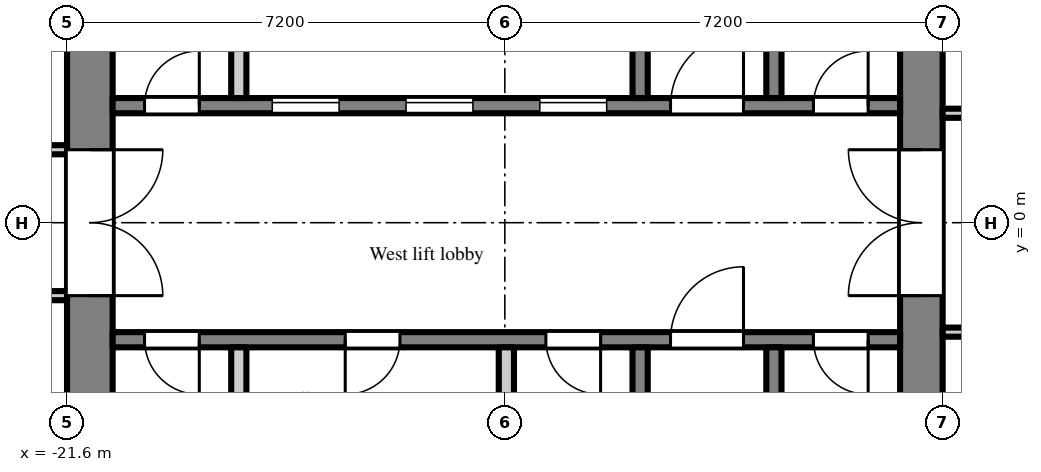
"""IFC4 building model, lengths in metres.
Left out: names, types, materials, properties, quantities, classifications, styles, units other than length and angle.
Written with IfcOpenShell. Run it as: python <this file> out.ifc"""

import sys

from ifc_helpers import new_model, si_unit, direction, frame, frame_2d, origin, place, context, subcontext, project, spatial, rectangle, extrude, element, fill, save


model = new_model("IFC4")
c1 = context("Model", 3, precision=1e-05, world=origin(), true_north=direction((0.0, 1.0)))
c2 = subcontext(c1, "Body", "Model", "MODEL_VIEW")
j1 = project(units=[si_unit("LENGTHUNIT", "METRE"), si_unit("PLANEANGLEUNIT", "RADIAN")], contexts=[c1])
p1 = place(None, origin())
s1 = spatial("IfcSite", under=j1, at=p1, CompositionType="ELEMENT")
p2 = place(p1, origin())
s2 = spatial("IfcBuilding", under=s1, at=p2, CompositionType="ELEMENT")
p3 = place(p2, frame((0.0, 0.0, 166.5)))
s3 = spatial("IfcBuildingStorey", under=s2, at=p3, CompositionType="ELEMENT", Elevation=166.5)
p4 = place(p3, frame((-7.55, -7.2, 0.0), z_axis=(0.0, 0.0, 1.0), x_axis=(0.0, 1.0, 0.0)))
e1 = element("IfcWall", 1, at=p4, inside=s3, PredefinedType="SHEAR", context=c2, shape_type="SweptSolid", body=[
    extrude(rectangle(XDim=14.4, YDim=0.7, at=frame_2d((7.2, 0.0))), origin(), (0.0, 0.0, 1.0), 3.8),
])
p5 = place(p4, frame((6.0, 0.0, 0.0)))
e2 = element("IfcOpeningElement", 2, at=p5, cuts=e1, PredefinedType="OPENING", context=c2, shape_type="SweptSolid", body=[
    extrude(rectangle(XDim=2.4, YDim=2.2, at=frame_2d((1.2, 1.1))), frame((0.0, 0.36, 0.0), z_axis=(0.0, -1.0, 0.0), x_axis=(1.0, 0.0, 0.0)), (0.0, 0.0, 1.0), 0.72),
])
p6 = place(p3, frame((-21.225, -7.2, 0.0), z_axis=(0.0, 0.0, 1.0), x_axis=(0.0, 1.0, 0.0)))
e3 = element("IfcWall", 3, at=p6, inside=s3, PredefinedType="SHEAR", context=c2, shape_type="SweptSolid", body=[
    extrude(rectangle(XDim=14.4, YDim=0.75, at=frame_2d((7.2, 0.0))), origin(), (0.0, 0.0, 1.0), 3.8),
])
p7 = place(p6, frame((6.0, 0.0, 0.0)))
e4 = element("IfcOpeningElement", 4, at=p7, cuts=e3, PredefinedType="OPENING", context=c2, shape_type="SweptSolid", body=[
    extrude(rectangle(XDim=2.4, YDim=2.2, at=frame_2d((1.2, 1.1))), frame((0.0, 0.385, 0.0), z_axis=(0.0, -1.0, 0.0), x_axis=(1.0, 0.0, 0.0)), (0.0, 0.0, 1.0), 0.77),
])
p8 = place(p3, frame((-7.9, 1.925, 0.0), z_axis=(0.0, 0.0, 1.0), x_axis=(-1.0, 0.0, 0.0)))
e5 = element("IfcWall", 5, at=p8, inside=s3, PredefinedType="SHEAR", context=c2, shape_type="SweptSolid", body=[
    extrude(rectangle(XDim=12.95, YDim=0.25, at=frame_2d((6.475, 0.0))), origin(), (0.0, 0.0, 1.0), 3.8),
])
p9 = place(p8, frame((4.825, 0.0, 0.0)))
e6 = element("IfcOpeningElement", 6, at=p9, cuts=e5, PredefinedType="OPENING", context=c2, shape_type="SweptSolid", body=[
    extrude(rectangle(XDim=1.1, YDim=2.1, at=frame_2d((0.55, 1.05))), frame((0.0, 0.135, 0.0), z_axis=(0.0, -1.0, 0.0), x_axis=(1.0, 0.0, 0.0)), (0.0, 0.0, 1.0), 0.27),
])
p10 = place(p8, frame((7.025, 0.0, 0.0)))
e7 = element("IfcOpeningElement", 7, at=p10, cuts=e5, PredefinedType="OPENING", context=c2, shape_type="SweptSolid", body=[
    extrude(rectangle(XDim=1.1, YDim=2.1, at=frame_2d((0.55, 1.05))), frame((0.0, 0.135, 0.0), z_axis=(0.0, -1.0, 0.0), x_axis=(1.0, 0.0, 0.0)), (0.0, 0.0, 1.0), 0.27),
])
p11 = place(p8, frame((9.225, 0.0, 0.0)))
e8 = element("IfcOpeningElement", 8, at=p11, cuts=e5, PredefinedType="OPENING", context=c2, shape_type="SweptSolid", body=[
    extrude(rectangle(XDim=1.1, YDim=2.1, at=frame_2d((0.55, 1.05))), frame((0.0, 0.135, 0.0), z_axis=(0.0, -1.0, 0.0), x_axis=(1.0, 0.0, 0.0)), (0.0, 0.0, 1.0), 0.27),
])
p12 = place(p8, frame((0.525, 0.0, 0.0)))
e9 = element("IfcOpeningElement", 9, at=p12, cuts=e5, PredefinedType="OPENING", context=c2, shape_type="SweptSolid", body=[
    extrude(rectangle(XDim=0.9, YDim=2.1, at=frame_2d((0.45, 1.05))), frame((0.0, 0.135, 0.0), z_axis=(0.0, -1.0, 0.0), x_axis=(1.0, 0.0, 0.0)), (0.0, 0.0, 1.0), 0.27),
])
p13 = place(p8, frame((2.575, 0.0, 0.0)))
e10 = element("IfcOpeningElement", 10, at=p13, cuts=e5, PredefinedType="OPENING", context=c2, shape_type="SweptSolid", body=[
    extrude(rectangle(XDim=1.2, YDim=2.1, at=frame_2d((0.6, 1.05))), frame((0.0, 0.135, 0.0), z_axis=(0.0, -1.0, 0.0), x_axis=(1.0, 0.0, 0.0)), (0.0, 0.0, 1.0), 0.27),
])
p14 = place(p8, frame((11.525, 0.0, 0.0)))
e11 = element("IfcOpeningElement", 11, at=p14, cuts=e5, PredefinedType="OPENING", context=c2, shape_type="SweptSolid", body=[
    extrude(rectangle(XDim=0.9, YDim=2.1, at=frame_2d((0.45, 1.05))), frame((0.0, 0.135, 0.0), z_axis=(0.0, -1.0, 0.0), x_axis=(1.0, 0.0, 0.0)), (0.0, 0.0, 1.0), 0.27),
])
p15 = place(p3, frame((-9.975, 2.05, 0.0), z_axis=(0.0, 0.0, 1.0), x_axis=(0.0, 1.0, 0.0)))
e12 = element("IfcWall", 12, at=p15, inside=s3, PredefinedType="SHEAR", context=c2, shape_type="SweptSolid", body=[
    extrude(rectangle(XDim=4.75, YDim=0.25, at=frame_2d((2.375, 0.0))), origin(), (0.0, 0.0, 1.0), 3.8),
])
p16 = place(p15, frame((2.95, 0.0, 0.0)))
e13 = element("IfcOpeningElement", 13, at=p16, cuts=e12, PredefinedType="OPENING", context=c2, shape_type="SweptSolid", body=[
    extrude(rectangle(XDim=1.1, YDim=2.1, at=frame_2d((0.55, 1.05))), frame((0.0, 0.135, 0.0), z_axis=(0.0, -1.0, 0.0), x_axis=(1.0, 0.0, 0.0)), (0.0, 0.0, 1.0), 0.27),
])
p17 = place(p3, frame((-12.175, 2.05, 0.0), z_axis=(0.0, 0.0, 1.0), x_axis=(0.0, 1.0, 0.0)))
e14 = element("IfcWall", 14, at=p17, inside=s3, PredefinedType="SHEAR", context=c2, shape_type="SweptSolid", body=[
    extrude(rectangle(XDim=4.75, YDim=0.25, at=frame_2d((2.375, 0.0))), origin(), (0.0, 0.0, 1.0), 3.8),
])
p18 = place(p17, frame((2.95, 0.0, 0.0)))
e15 = element("IfcOpeningElement", 15, at=p18, cuts=e14, PredefinedType="OPENING", context=c2, shape_type="SweptSolid", body=[
    extrude(rectangle(XDim=1.2, YDim=2.1, at=frame_2d((0.6, 1.05))), frame((0.0, 0.135, 0.0), z_axis=(0.0, -1.0, 0.0), x_axis=(1.0, 0.0, 0.0)), (0.0, 0.0, 1.0), 0.27),
])
p19 = place(p3, frame((-18.775, 2.05, 0.0), z_axis=(0.0, 0.0, 1.0), x_axis=(0.0, 1.0, 0.0)))
e16 = element("IfcWall", 16, at=p19, inside=s3, PredefinedType="PARTITIONING", context=c2, shape_type="SweptSolid", body=[
    extrude(rectangle(XDim=2.1, YDim=0.25, at=frame_2d((1.05, 0.0))), origin(), (0.0, 0.0, 1.0), 3.8),
])
p20 = place(p3, frame((-7.9, -1.925, 0.0), z_axis=(0.0, 0.0, 1.0), x_axis=(-1.0, 0.0, 0.0)))
e17 = element("IfcWall", 17, at=p20, inside=s3, PredefinedType="SHEAR", context=c2, shape_type="SweptSolid", body=[
    extrude(rectangle(XDim=12.95, YDim=0.25, at=frame_2d((6.475, 0.0))), origin(), (0.0, 0.0, 1.0), 3.8),
])
p21 = place(p20, frame((0.525, 0.0, 0.0)))
e18 = element("IfcOpeningElement", 18, at=p21, cuts=e17, PredefinedType="OPENING", context=c2, shape_type="SweptSolid", body=[
    extrude(rectangle(XDim=0.9, YDim=2.1, at=frame_2d((0.45, 1.05))), frame((0.0, 0.135, 0.0), z_axis=(0.0, -1.0, 0.0), x_axis=(1.0, 0.0, 0.0)), (0.0, 0.0, 1.0), 0.27),
])
p22 = place(p20, frame((2.575, 0.0, 0.0)))
e19 = element("IfcOpeningElement", 19, at=p22, cuts=e17, PredefinedType="OPENING", context=c2, shape_type="SweptSolid", body=[
    extrude(rectangle(XDim=1.2, YDim=2.1, at=frame_2d((0.6, 1.05))), frame((0.0, 0.135, 0.0), z_axis=(0.0, -1.0, 0.0), x_axis=(1.0, 0.0, 0.0)), (0.0, 0.0, 1.0), 0.27),
])
p23 = place(p20, frame((4.925, 0.0, 0.0)))
e20 = element("IfcOpeningElement", 20, at=p23, cuts=e17, PredefinedType="OPENING", context=c2, shape_type="SweptSolid", body=[
    extrude(rectangle(XDim=0.9, YDim=2.1, at=frame_2d((0.45, 1.05))), frame((0.0, 0.135, 0.0), z_axis=(0.0, -1.0, 0.0), x_axis=(1.0, 0.0, 0.0)), (0.0, 0.0, 1.0), 0.27),
])
p24 = place(p20, frame((8.225, 0.0, 0.0)))
e21 = element("IfcOpeningElement", 21, at=p24, cuts=e17, PredefinedType="OPENING", context=c2, shape_type="SweptSolid", body=[
    extrude(rectangle(XDim=0.9, YDim=2.1, at=frame_2d((0.45, 1.05))), frame((0.0, 0.135, 0.0), z_axis=(0.0, -1.0, 0.0), x_axis=(1.0, 0.0, 0.0)), (0.0, 0.0, 1.0), 0.27),
])
p25 = place(p20, frame((11.525, 0.0, 0.0)))
e22 = element("IfcOpeningElement", 22, at=p25, cuts=e17, PredefinedType="OPENING", context=c2, shape_type="SweptSolid", body=[
    extrude(rectangle(XDim=0.9, YDim=2.1, at=frame_2d((0.45, 1.05))), frame((0.0, 0.135, 0.0), z_axis=(0.0, -1.0, 0.0), x_axis=(1.0, 0.0, 0.0)), (0.0, 0.0, 1.0), 0.27),
])
p26 = place(p3, frame((-9.975, -2.05, 0.0), z_axis=(0.0, 0.0, 1.0), x_axis=(0.0, -1.0, 0.0)))
e23 = element("IfcWall", 23, at=p26, inside=s3, PredefinedType="SHEAR", context=c2, shape_type="SweptSolid", body=[
    extrude(rectangle(XDim=4.75, YDim=0.25, at=frame_2d((2.375, 0.0))), origin(), (0.0, 0.0, 1.0), 3.8),
])
p27 = place(p26, frame((2.95, 0.0, 0.0)))
e24 = element("IfcOpeningElement", 24, at=p27, cuts=e23, PredefinedType="OPENING", context=c2, shape_type="SweptSolid", body=[
    extrude(rectangle(XDim=1.1, YDim=2.1, at=frame_2d((0.55, 1.05))), frame((0.0, 0.135, 0.0), z_axis=(0.0, -1.0, 0.0), x_axis=(1.0, 0.0, 0.0)), (0.0, 0.0, 1.0), 0.27),
])
p28 = place(p3, frame((-12.175, -2.05, 0.0), z_axis=(0.0, 0.0, 1.0), x_axis=(0.0, -1.0, 0.0)))
e25 = element("IfcWall", 25, at=p28, inside=s3, PredefinedType="SHEAR", context=c2, shape_type="SweptSolid", body=[
    extrude(rectangle(XDim=4.75, YDim=0.25, at=frame_2d((2.375, 0.0))), origin(), (0.0, 0.0, 1.0), 3.8),
])
p29 = place(p28, frame((2.95, 0.0, 0.0)))
e26 = element("IfcOpeningElement", 26, at=p29, cuts=e25, PredefinedType="OPENING", context=c2, shape_type="SweptSolid", body=[
    extrude(rectangle(XDim=1.2, YDim=2.1, at=frame_2d((0.6, 1.05))), frame((0.0, 0.135, 0.0), z_axis=(0.0, -1.0, 0.0), x_axis=(1.0, 0.0, 0.0)), (0.0, 0.0, 1.0), 0.27),
])
for number, where, z_axis, x_axis in (
    (27, (-14.375, -2.05, 0.0), (0.0, 0.0, 1.0), (0.0, -1.0, 0.0)),
    (28, (-18.775, -2.05, 0.0), (0.0, 0.0, 1.0), (0.0, -1.0, 0.0)),
):
    element("IfcWall", number, at=place(p3, frame(where, z_axis=z_axis, x_axis=x_axis)), inside=s3, PredefinedType="PARTITIONING", context=c2, shape_type="SweptSolid", body=[
        extrude(rectangle(XDim=2.1, YDim=0.25, at=frame_2d((1.05, 0.0))), origin(), (0.0, 0.0, 1.0), 3.8),
    ])
p30 = place(p3, frame((-36.5, -1.2, 0.0), z_axis=(0.0, 0.0, 1.0), x_axis=(1.0, 0.0, 0.0)))
e29 = element("IfcWall", 29, at=p30, inside=s3, PredefinedType="PARTITIONING", context=c2, shape_type="SweptSolid", body=[
    extrude(rectangle(XDim=14.9, YDim=0.15, at=frame_2d((7.45, 0.0))), origin(), (0.0, 0.0, 1.0), 3.8),
])
p31 = place(p30, frame((6.15, 0.0, 0.0)))
e30 = element("IfcOpeningElement", 30, at=p31, cuts=e29, PredefinedType="OPENING", context=c2, shape_type="SweptSolid", body=[
    extrude(rectangle(XDim=1.8, YDim=2.1, at=frame_2d((0.9, 1.05))), frame((0.0, 0.085, 0.0), z_axis=(0.0, -1.0, 0.0), x_axis=(1.0, 0.0, 0.0)), (0.0, 0.0, 1.0), 0.17),
])
p32 = place(p30, frame((9.2, 0.0, 0.0)))
e31 = element("IfcOpeningElement", 31, at=p32, cuts=e29, PredefinedType="OPENING", context=c2, shape_type="SweptSolid", body=[
    extrude(rectangle(XDim=1.8, YDim=2.1, at=frame_2d((0.9, 1.05))), frame((0.0, 0.085, 0.0), z_axis=(0.0, -1.0, 0.0), x_axis=(1.0, 0.0, 0.0)), (0.0, 0.0, 1.0), 0.17),
])
p33 = place(p30, frame((12.45, 0.0, 0.0)))
e32 = element("IfcOpeningElement", 32, at=p33, cuts=e29, PredefinedType="OPENING", context=c2, shape_type="SweptSolid", body=[
    extrude(rectangle(XDim=1.8, YDim=2.1, at=frame_2d((0.9, 1.05))), frame((0.0, 0.085, 0.0), z_axis=(0.0, -1.0, 0.0), x_axis=(1.0, 0.0, 0.0)), (0.0, 0.0, 1.0), 0.17),
])
p34 = place(p30, frame((2.15, 0.0, 0.0)))
e33 = element("IfcOpeningElement", 33, at=p34, cuts=e29, PredefinedType="OPENING", context=c2, shape_type="SweptSolid", body=[
    extrude(rectangle(XDim=1.0, YDim=2.1, at=frame_2d((0.5, 1.05))), frame((0.0, 0.085, 0.0), z_axis=(0.0, -1.0, 0.0), x_axis=(1.0, 0.0, 0.0)), (0.0, 0.0, 1.0), 0.17),
])
p35 = place(p3, frame((-36.5, 1.2, 0.0), z_axis=(0.0, 0.0, 1.0), x_axis=(1.0, 0.0, 0.0)))
e34 = element("IfcWall", 34, at=p35, inside=s3, PredefinedType="PARTITIONING", context=c2, shape_type="SweptSolid", body=[
    extrude(rectangle(XDim=14.9, YDim=0.15, at=frame_2d((7.45, 0.0))), origin(), (0.0, 0.0, 1.0), 3.8),
])
p36 = place(p35, frame((3.55, 0.0, 0.0)))
e35 = element("IfcOpeningElement", 35, at=p36, cuts=e34, PredefinedType="OPENING", context=c2, shape_type="SweptSolid", body=[
    extrude(rectangle(XDim=1.8, YDim=2.1, at=frame_2d((0.9, 1.05))), frame((0.0, 0.085, 0.0), z_axis=(0.0, -1.0, 0.0), x_axis=(1.0, 0.0, 0.0)), (0.0, 0.0, 1.0), 0.17),
])
p37 = place(p35, frame((8.4, 0.0, 0.0)))
e36 = element("IfcOpeningElement", 36, at=p37, cuts=e34, PredefinedType="OPENING", context=c2, shape_type="SweptSolid", body=[
    extrude(rectangle(XDim=1.0, YDim=2.1, at=frame_2d((0.5, 1.05))), frame((0.0, 0.085, 0.0), z_axis=(0.0, -1.0, 0.0), x_axis=(1.0, 0.0, 0.0)), (0.0, 0.0, 1.0), 0.17),
])
p38 = place(p35, frame((12.25, 0.0, 0.0)))
e37 = element("IfcOpeningElement", 37, at=p38, cuts=e34, PredefinedType="OPENING", context=c2, shape_type="SweptSolid", body=[
    extrude(rectangle(XDim=1.8, YDim=2.1, at=frame_2d((0.9, 1.05))), frame((0.0, 0.085, 0.0), z_axis=(0.0, -1.0, 0.0), x_axis=(1.0, 0.0, 0.0)), (0.0, 0.0, 1.0), 0.17),
])
p39 = place(p35, frame((0.55, 0.0, 0.0)))
e38 = element("IfcOpeningElement", 38, at=p39, cuts=e34, PredefinedType="OPENING", context=c2, shape_type="SweptSolid", body=[
    extrude(rectangle(XDim=1.8, YDim=2.1, at=frame_2d((0.9, 1.05))), frame((0.0, 0.085, 0.0), z_axis=(0.0, -1.0, 0.0), x_axis=(1.0, 0.0, 0.0)), (0.0, 0.0, 1.0), 0.17),
])
p40 = place(p3, frame((-7.2, -1.8, 0.0), z_axis=(0.0, 0.0, 1.0), x_axis=(1.0, 0.0, 0.0)))
e39 = element("IfcWall", 39, at=p40, inside=s3, PredefinedType="PARTITIONING", context=c2, shape_type="SweptSolid", body=[
    extrude(rectangle(XDim=5.325, YDim=0.15, at=frame_2d((2.663, 0.0))), origin(), (0.0, 0.0, 1.0), 3.8),
])
p41 = place(p40, frame((1.305, 0.0, 0.0)))
e40 = element("IfcOpeningElement", 40, at=p41, cuts=e39, PredefinedType="OPENING", context=c2, shape_type="SweptSolid", body=[
    extrude(rectangle(XDim=0.9, YDim=2.1, at=frame_2d((0.45, 1.05))), frame((0.0, 0.085, 0.0), z_axis=(0.0, -1.0, 0.0), x_axis=(1.0, 0.0, 0.0)), (0.0, 0.0, 1.0), 0.17),
])
p42 = place(p3, frame((-7.2, 1.8, 0.0), z_axis=(0.0, 0.0, 1.0), x_axis=(1.0, 0.0, 0.0)))
e41 = element("IfcWall", 41, at=p42, inside=s3, PredefinedType="PARTITIONING", context=c2, shape_type="SweptSolid", body=[
    extrude(rectangle(XDim=5.325, YDim=0.15, at=frame_2d((2.663, 0.0))), origin(), (0.0, 0.0, 1.0), 3.8),
])
p43 = place(p42, frame((0.65, 0.0, 0.0)))
e42 = element("IfcOpeningElement", 42, at=p43, cuts=e41, PredefinedType="OPENING", context=c2, shape_type="SweptSolid", body=[
    extrude(rectangle(XDim=0.9, YDim=2.1, at=frame_2d((0.45, 1.05))), frame((0.0, 0.085, 0.0), z_axis=(0.0, -1.0, 0.0), x_axis=(1.0, 0.0, 0.0)), (0.0, 0.0, 1.0), 0.17),
])
p44 = place(p42, frame((4.325, 0.0, 0.0)))
e43 = element("IfcOpeningElement", 43, at=p44, cuts=e41, PredefinedType="OPENING", context=c2, shape_type="SweptSolid", body=[
    extrude(rectangle(XDim=0.9, YDim=2.1, at=frame_2d((0.45, 1.05))), frame((0.0, 0.085, 0.0), z_axis=(0.0, -1.0, 0.0), x_axis=(1.0, 0.0, 0.0)), (0.0, 0.0, 1.0), 0.17),
])
p45 = place(p9, origin())
e44 = element("IfcDoor", 44, at=p45, inside=s3, OperationType="SLIDING_TO_LEFT", PredefinedType="DOOR", context=c2, shape_type="SweptSolid", body=[
    extrude(rectangle(XDim=1.1, YDim=2.1, at=frame_2d((0.55, 1.05))), frame((0.0, 0.025, 0.0), z_axis=(0.0, -1.0, 0.0), x_axis=(1.0, 0.0, 0.0)), (0.0, 0.0, 1.0), 0.05),
])
fill(e6, e44)
p46 = place(p10, origin())
e45 = element("IfcDoor", 45, at=p46, inside=s3, OperationType="SLIDING_TO_LEFT", PredefinedType="DOOR", context=c2, shape_type="SweptSolid", body=[
    extrude(rectangle(XDim=1.1, YDim=2.1, at=frame_2d((0.55, 1.05))), frame((0.0, 0.025, 0.0), z_axis=(0.0, -1.0, 0.0), x_axis=(1.0, 0.0, 0.0)), (0.0, 0.0, 1.0), 0.05),
])
fill(e7, e45)
p47 = place(p11, origin())
e46 = element("IfcDoor", 46, at=p47, inside=s3, OperationType="SLIDING_TO_LEFT", PredefinedType="DOOR", context=c2, shape_type="SweptSolid", body=[
    extrude(rectangle(XDim=1.1, YDim=2.1, at=frame_2d((0.55, 1.05))), frame((0.0, 0.025, 0.0), z_axis=(0.0, -1.0, 0.0), x_axis=(1.0, 0.0, 0.0)), (0.0, 0.0, 1.0), 0.05),
])
fill(e8, e46)
p48 = place(p12, frame((0.9, 0.0, 0.0), z_axis=(0.0, 0.0, 1.0), x_axis=(-1.0, 0.0, 0.0)))
e47 = element("IfcDoor", 47, at=p48, inside=s3, OperationType="SINGLE_SWING_RIGHT", PredefinedType="DOOR", context=c2, shape_type="SweptSolid", body=[
    extrude(rectangle(XDim=0.9, YDim=2.1, at=frame_2d((0.45, 1.05))), frame((0.0, 0.025, 0.0), z_axis=(0.0, -1.0, 0.0), x_axis=(1.0, 0.0, 0.0)), (0.0, 0.0, 1.0), 0.05),
])
fill(e9, e47)
p49 = place(p21, origin())
e48 = element("IfcDoor", 48, at=p49, inside=s3, OperationType="SINGLE_SWING_LEFT", PredefinedType="DOOR", context=c2, shape_type="SweptSolid", body=[
    extrude(rectangle(XDim=0.9, YDim=2.1, at=frame_2d((0.45, 1.05))), frame((0.0, 0.025, 0.0), z_axis=(0.0, -1.0, 0.0), x_axis=(1.0, 0.0, 0.0)), (0.0, 0.0, 1.0), 0.05),
])
fill(e18, e48)
p50 = place(p13, frame((1.2, 0.0, 0.0), z_axis=(0.0, 0.0, 1.0), x_axis=(-1.0, 0.0, 0.0)))
e49 = element("IfcDoor", 49, at=p50, inside=s3, OperationType="SINGLE_SWING_RIGHT", PredefinedType="DOOR", context=c2, shape_type="SweptSolid", body=[
    extrude(rectangle(XDim=1.2, YDim=2.1, at=frame_2d((0.6, 1.05))), frame((0.0, 0.025, 0.0), z_axis=(0.0, -1.0, 0.0), x_axis=(1.0, 0.0, 0.0)), (0.0, 0.0, 1.0), 0.05),
])
fill(e10, e49)
p51 = place(p22, frame((1.2, 0.0, 0.0), z_axis=(0.0, 0.0, 1.0), x_axis=(-1.0, 0.0, 0.0)))
e50 = element("IfcDoor", 50, at=p51, inside=s3, OperationType="SINGLE_SWING_RIGHT", PredefinedType="DOOR", context=c2, shape_type="SweptSolid", body=[
    extrude(rectangle(XDim=1.2, YDim=2.1, at=frame_2d((0.6, 1.05))), frame((0.0, 0.025, 0.0), z_axis=(0.0, -1.0, 0.0), x_axis=(1.0, 0.0, 0.0)), (0.0, 0.0, 1.0), 0.05),
])
fill(e19, e50)
p52 = place(p5, origin())
e51 = element("IfcDoor", 51, at=p52, inside=s3, OperationType="DOUBLE_DOOR_DOUBLE_SWING", PredefinedType="DOOR", context=c2, shape_type="SweptSolid", body=[
    extrude(rectangle(XDim=2.4, YDim=2.2, at=frame_2d((1.2, 1.1))), frame((0.0, 0.025, 0.0), z_axis=(0.0, -1.0, 0.0), x_axis=(1.0, 0.0, 0.0)), (0.0, 0.0, 1.0), 0.05),
])
fill(e2, e51)
p53 = place(p7, frame((2.4, 0.0, 0.0), z_axis=(0.0, 0.0, 1.0), x_axis=(-1.0, 0.0, 0.0)))
e52 = element("IfcDoor", 52, at=p53, inside=s3, OperationType="DOUBLE_DOOR_DOUBLE_SWING", PredefinedType="DOOR", context=c2, shape_type="SweptSolid", body=[
    extrude(rectangle(XDim=2.4, YDim=2.2, at=frame_2d((1.2, 1.1))), frame((0.0, 0.025, 0.0), z_axis=(0.0, -1.0, 0.0), x_axis=(1.0, 0.0, 0.0)), (0.0, 0.0, 1.0), 0.05),
])
fill(e4, e52)
p54 = place(p14, frame((0.9, 0.0, 0.0), z_axis=(0.0, 0.0, 1.0), x_axis=(-1.0, 0.0, 0.0)))
e53 = element("IfcDoor", 53, at=p54, inside=s3, OperationType="SINGLE_SWING_RIGHT", PredefinedType="DOOR", context=c2, shape_type="SweptSolid", body=[
    extrude(rectangle(XDim=0.9, YDim=2.1, at=frame_2d((0.45, 1.05))), frame((0.0, 0.025, 0.0), z_axis=(0.0, -1.0, 0.0), x_axis=(1.0, 0.0, 0.0)), (0.0, 0.0, 1.0), 0.05),
])
fill(e11, e53)
p55 = place(p23, origin())
e54 = element("IfcDoor", 54, at=p55, inside=s3, OperationType="SINGLE_SWING_LEFT", PredefinedType="DOOR", context=c2, shape_type="SweptSolid", body=[
    extrude(rectangle(XDim=0.9, YDim=2.1, at=frame_2d((0.45, 1.05))), frame((0.0, 0.025, 0.0), z_axis=(0.0, -1.0, 0.0), x_axis=(1.0, 0.0, 0.0)), (0.0, 0.0, 1.0), 0.05),
])
fill(e20, e54)
p56 = place(p24, origin())
e55 = element("IfcDoor", 55, at=p56, inside=s3, OperationType="SINGLE_SWING_RIGHT", PredefinedType="DOOR", context=c2, shape_type="SweptSolid", body=[
    extrude(rectangle(XDim=0.9, YDim=2.1, at=frame_2d((0.45, 1.05))), frame((0.0, 0.025, 0.0), z_axis=(0.0, -1.0, 0.0), x_axis=(1.0, 0.0, 0.0)), (0.0, 0.0, 1.0), 0.05),
])
fill(e21, e55)
p57 = place(p25, origin())
e56 = element("IfcDoor", 56, at=p57, inside=s3, OperationType="SINGLE_SWING_LEFT", PredefinedType="DOOR", context=c2, shape_type="SweptSolid", body=[
    extrude(rectangle(XDim=0.9, YDim=2.1, at=frame_2d((0.45, 1.05))), frame((0.0, 0.025, 0.0), z_axis=(0.0, -1.0, 0.0), x_axis=(1.0, 0.0, 0.0)), (0.0, 0.0, 1.0), 0.05),
])
fill(e22, e56)
save(model, sys.argv[1])
